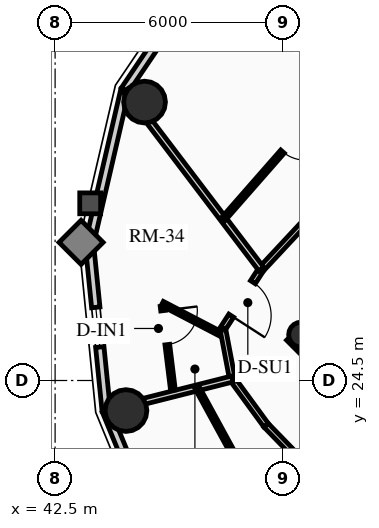
"""IFC4 building model, lengths in metres.
Left out: names, types, materials, properties, quantities, classifications, styles, units other than length and angle.
Written with IfcOpenShell. Run it as: python <this file> out.ifc"""

import sys

from ifc_helpers import new_model, si_unit, direction, frame, frame_2d, origin, origin_2d, place, context, subcontext, project, spatial, rectangle, circle, hollow_circle, extrude, source, transform, mapped, element, fill, save


model = new_model("IFC4")
c1 = context("Model", 3, precision=1e-05, world=origin(), true_north=direction((0.0, 1.0)))
c2 = subcontext(c1, "Body", "Model", "MODEL_VIEW")
j1 = project(units=[si_unit("LENGTHUNIT", "METRE"), si_unit("PLANEANGLEUNIT", "RADIAN")], contexts=[c1])
p1 = place(None, origin())
s1 = spatial("IfcSite", under=j1, at=p1, CompositionType="ELEMENT")
p2 = place(p1, origin())
s2 = spatial("IfcBuilding", under=s1, at=p2, CompositionType="ELEMENT")
p3 = place(p2, frame((0.0, 0.0, 219.94)))
s3 = spatial("IfcBuildingStorey", under=s2, at=p3, CompositionType="ELEMENT", Elevation=219.94)
p4 = place(p3, frame((58.702, 15.732, 0.0), z_axis=(0.0, 0.0, 1.0), x_axis=(-0.707106781187, 0.707106781187, 0.0)))
e1 = element("IfcWall", 1, at=p4, inside=s3, PredefinedType="SHEAR", context=c2, shape_type="SweptSolid", body=[
    extrude(rectangle(XDim=14.1, YDim=0.4, at=frame_2d((7.05, 0.0))), origin(), (0.0, 0.0, 1.0), 2.91),
])
p5 = place(p3, frame((48.873, 25.561, 0.0), z_axis=(0.0, 0.0, 1.0), x_axis=(0.707106781187, 0.707106781187, 0.0)))
e2 = element("IfcWall", 2, at=p5, inside=s3, PredefinedType="SHEAR", context=c2, shape_type="SweptSolid", body=[
    extrude(rectangle(XDim=10.7, YDim=0.4, at=frame_2d((5.35, 0.0))), origin(), (0.0, 0.0, 1.0), 2.91),
])
m1 = source(origin(), c2, "Body", "SweptSolid", [
    extrude(rectangle(XDim=1.5, YDim=2.02, at=frame_2d((0.75, 1.01))), frame((0.0, 0.21, 0.0), z_axis=(0.0, -1.0, 0.0), x_axis=(1.0, 0.0, 0.0)), (0.0, 0.0, 1.0), 0.42),
])
p6 = place(p5, frame((4.6, 0.0, 0.0)))
e3 = element("IfcOpeningElement", 3, at=p6, cuts=e2, PredefinedType="OPENING", context=c2, shape_type="MappedRepresentation", body=[
    mapped(m1, transform((0.0, 0.0, 0.0), x_axis=(1.0, 0.0, 0.0), y_axis=(0.0, 1.0, 0.0), z_axis=(0.0, 0.0, 1.0), scale=1.0)),
])
p7 = place(p3, frame((48.976, 25.706, 0.0), z_axis=(0.0, 0.0, 1.0), x_axis=(0.707106781187, 0.707106781187, 0.0)))
e4 = element("IfcColumn", 4, at=p7, inside=s3, PredefinedType="COLUMN", context=c2, shape_type="SweptSolid", body=[
    extrude(hollow_circle(Radius=0.33, WallThickness=0.025, at=origin_2d()), origin(), (0.0, 0.0, 1.0), 2.91),
])
for number, where, z_axis, x_axis in (
    (5, (44.854, 31.827, 0.0), (0.0, 0.0, 1.0), (1.0, 0.0, 0.0)),
    (6, (44.365, 23.709, 0.0), (0.0, 0.0, 1.0), (1.0, 0.0, 0.0)),
):
    element("IfcColumn", number, at=place(p3, frame(where, z_axis=z_axis, x_axis=x_axis)), inside=s3, PredefinedType="USERDEFINED", context=c2, shape_type="SweptSolid", body=[
        extrude(circle(Radius=0.55, at=origin_2d()), origin(), (0.0, 0.0, 1.0), 2.91),
    ])
p8 = place(p3, frame((44.337, 32.144, 0.0), z_axis=(0.0, 0.0, 1.0), x_axis=(0.559495003079, 0.828833723692, 0.0)))
e7 = element("IfcWall", 7, at=p8, inside=s3, PredefinedType="SOLIDWALL", context=c2, shape_type="SweptSolid", body=[
    extrude(rectangle(XDim=3.976, YDim=0.22, at=frame_2d((1.988, 0.0))), origin(), (0.0, 0.0, 1.0), 2.322),
])
m2 = source(origin(), c2, "Body", "SweptSolid", [
    extrude(rectangle(XDim=1.05, YDim=1.3, at=frame_2d((0.525, 0.65))), frame((0.0, 0.12, 0.0), z_axis=(0.0, -1.0, 0.0), x_axis=(1.0, 0.0, 0.0)), (0.0, 0.0, 1.0), 0.24),
])
p9 = place(p8, frame((1.463, 0.0, 0.65)))
e8 = element("IfcOpeningElement", 8, at=p9, cuts=e7, PredefinedType="OPENING", context=c2, shape_type="MappedRepresentation", body=[
    mapped(m2, transform((0.0, 0.0, 0.0), x_axis=(1.0, 0.0, 0.0), y_axis=(0.0, 1.0, 0.0), z_axis=(0.0, 0.0, 1.0), scale=1.0)),
])
p10 = place(p3, frame((43.401, 28.1, 0.0), z_axis=(0.0, 0.0, 1.0), x_axis=(0.225473813158, 0.974249228678, 0.0)))
e9 = element("IfcWall", 9, at=p10, inside=s3, PredefinedType="SOLIDWALL", context=c2, shape_type="SweptSolid", body=[
    extrude(rectangle(XDim=4.15, YDim=0.22, at=frame_2d((2.075, 0.0))), origin(), (0.0, 0.0, 1.0), 2.322),
])
p11 = place(p3, frame((43.845, 23.705, 0.0), z_axis=(0.0, 0.0, 1.0), x_axis=(-0.100570534541, 0.994929930991, 0.0)))
e10 = element("IfcWall", 10, at=p11, inside=s3, PredefinedType="SOLIDWALL", context=c2, shape_type="SweptSolid", body=[
    extrude(rectangle(XDim=4.418, YDim=0.22, at=frame_2d((2.209, 0.0))), origin(), (0.0, 0.0, 1.0), 2.322),
])
p12 = place(p11, frame((1.684, 0.0, 0.65)))
e11 = element("IfcOpeningElement", 11, at=p12, cuts=e10, PredefinedType="OPENING", context=c2, shape_type="MappedRepresentation", body=[
    mapped(m2, transform((0.0, 0.0, 0.0), x_axis=(1.0, 0.0, 0.0), y_axis=(0.0, 1.0, 0.0), z_axis=(0.0, 0.0, 1.0), scale=1.0)),
])
p13 = place(p3, frame((45.626, 19.387, 0.0), z_axis=(0.0, 0.0, 1.0), x_axis=(-0.381309704956, 0.924447353237, 0.0)))
e12 = element("IfcWall", 12, at=p13, inside=s3, PredefinedType="SOLIDWALL", context=c2, shape_type="SweptSolid", body=[
    extrude(rectangle(XDim=4.671, YDim=0.22, at=frame_2d((2.335, 0.0))), origin(), (0.0, 0.0, 1.0), 2.322),
])
p14 = place(p13, frame((1.81, 0.0, 0.65)))
e13 = element("IfcOpeningElement", 13, at=p14, cuts=e12, PredefinedType="OPENING", context=c2, shape_type="MappedRepresentation", body=[
    mapped(m2, transform((0.0, 0.0, 0.0), x_axis=(1.0, 0.0, 0.0), y_axis=(0.0, 1.0, 0.0), z_axis=(0.0, 0.0, 1.0), scale=1.0)),
])
p15 = place(p3, frame((52.212, 32.024, 0.0), z_axis=(0.0, 0.0, 1.0), x_axis=(-0.682158998173, -0.731203871169, 0.0)))
e14 = element("IfcWall", 14, at=p15, inside=s3, PredefinedType="PARTITIONING", context=c2, shape_type="SweptSolid", body=[
    extrude(rectangle(XDim=6.282, YDim=0.15, at=frame_2d((3.141, 0.0))), origin(), (0.0, 0.0, 1.0), 2.255),
])
p16 = place(p3, frame((47.927, 27.431, 0.0), z_axis=(0.0, 0.0, 1.0), x_axis=(-0.543126643356, -0.839650790077, 0.0)))
e15 = element("IfcWall", 15, at=p16, inside=s3, PredefinedType="PARTITIONING", context=c2, shape_type="SweptSolid", body=[
    extrude(rectangle(XDim=1.868, YDim=0.15, at=frame_2d((0.934, 0.0))), origin(), (0.0, 0.0, 1.0), 2.255),
])
m3 = source(origin(), c2, "Body", "SweptSolid", [
    extrude(rectangle(XDim=1.05, YDim=2.015, at=frame_2d((0.525, 1.007))), frame((0.0, 0.085, 0.0), z_axis=(0.0, -1.0, 0.0), x_axis=(1.0, 0.0, 0.0)), (0.0, 0.0, 1.0), 0.17),
])
p17 = place(p16, frame((0.409, 0.0, 0.0)))
e16 = element("IfcOpeningElement", 16, at=p17, cuts=e15, PredefinedType="OPENING", context=c2, shape_type="MappedRepresentation", body=[
    mapped(m3, transform((0.0, 0.0, 0.0), x_axis=(1.0, 0.0, 0.0), y_axis=(0.0, 1.0, 0.0), z_axis=(0.0, 0.0, 1.0), scale=1.0)),
])
p18 = place(p3, frame((46.912, 25.862, 0.0), z_axis=(0.0, 0.0, 1.0), x_axis=(0.186095172215, -0.98253172309, 0.0)))
e17 = element("IfcWall", 17, at=p18, inside=s3, PredefinedType="PARTITIONING", context=c2, shape_type="SweptSolid", body=[
    extrude(rectangle(XDim=1.346, YDim=0.15, at=frame_2d((0.673, 0.0))), origin(), (0.0, 0.0, 1.0), 2.322),
])
p19 = place(p3, frame((47.163, 24.54, 0.0), z_axis=(0.0, 0.0, 1.0), x_axis=(0.589711902124, -0.807613690135, 0.0)))
e18 = element("IfcWall", 18, at=p19, inside=s3, PredefinedType="PARTITIONING", context=c2, shape_type="SweptSolid", body=[
    extrude(rectangle(XDim=1.507, YDim=0.15, at=frame_2d((0.753, 0.0))), origin(), (0.0, 0.0, 1.0), 2.255),
])
p20 = place(p3, frame((48.052, 23.323, 0.0), z_axis=(0.0, 0.0, 1.0), x_axis=(0.696573981306, -0.717484974454, 0.0)))
e19 = element("IfcWall", 19, at=p20, inside=s3, PredefinedType="PARTITIONING", context=c2, shape_type="SweptSolid", body=[
    extrude(rectangle(XDim=5.849, YDim=0.15, at=frame_2d((2.925, 0.0))), origin(), (0.0, 0.0, 1.0), 2.685),
])
p21 = place(p3, frame((47.927, 27.431, 0.0), z_axis=(0.0, 0.0, 1.0), x_axis=(-0.604823333103, 0.796359677366, 0.0)))
e20 = element("IfcWall", 20, at=p21, inside=s3, PredefinedType="PARTITIONING", context=c2, shape_type="SweptSolid", body=[
    extrude(rectangle(XDim=5.907, YDim=0.16, at=frame_2d((2.953, 0.0))), origin(), (0.0, 0.0, 1.0), 2.322),
])
p22 = place(p3, frame((47.163, 24.54, 0.0), z_axis=(0.0, 0.0, 1.0), x_axis=(-0.9696166611, -0.244629373781, 0.0)))
e21 = element("IfcWall", 21, at=p22, inside=s3, PredefinedType="PARTITIONING", context=c2, shape_type="SweptSolid", body=[
    extrude(rectangle(XDim=3.401, YDim=0.16, at=frame_2d((1.701, 0.0))), origin(), (0.0, 0.0, 1.0), 2.322),
])
p23 = place(p3, frame((50.634, 32.977, 0.0), z_axis=(0.0, 0.0, 1.0), x_axis=(-0.659241945747, -0.751930885765, 0.0)))
e22 = element("IfcWall", 22, at=p23, inside=s3, PredefinedType="PARTITIONING", context=c2, shape_type="SweptSolid", body=[
    extrude(rectangle(XDim=5.624, YDim=0.125, at=frame_2d((2.812, 0.0))), origin(), (0.0, 0.0, 1.0), 2.255),
])
m4 = source(origin(), c2, "Body", "SweptSolid", [
    extrude(rectangle(XDim=0.9, YDim=2.005, at=frame_2d((0.45, 1.002))), frame((0.0, 0.073, 0.0), z_axis=(0.0, -1.0, 0.0), x_axis=(1.0, 0.0, 0.0)), (0.0, 0.0, 1.0), 0.145),
])
p24 = place(p23, frame((2.362, 0.0, 0.0)))
e23 = element("IfcOpeningElement", 23, at=p24, cuts=e22, PredefinedType="OPENING", context=c2, shape_type="MappedRepresentation", body=[
    mapped(m4, transform((0.0, 0.0, 0.0), x_axis=(1.0, 0.0, 0.0), y_axis=(0.0, 1.0, 0.0), z_axis=(0.0, 0.0, 1.0), scale=1.0)),
])
p25 = place(p3, frame((46.844, 25.731, 0.0), z_axis=(0.0, 0.0, 1.0), x_axis=(-0.886802533251, 0.462148533504, 0.0)))
e24 = element("IfcWall", 24, at=p25, inside=s3, PredefinedType="PARTITIONING", context=c2, shape_type="SweptSolid", body=[
    extrude(rectangle(XDim=1.719, YDim=0.125, at=frame_2d((0.859, 0.0))), origin(), (0.0, 0.0, 1.0), 2.685),
])
p26 = place(p3, frame((45.328, 26.457, 0.0), z_axis=(0.0, 0.0, 1.0), x_axis=(0.122605181354, -0.992455525203, 0.0)))
e25 = element("IfcWall", 25, at=p26, inside=s3, PredefinedType="PARTITIONING", context=c2, shape_type="SweptSolid", body=[
    extrude(rectangle(XDim=2.228, YDim=0.125, at=frame_2d((1.114, 0.0))), origin(), (0.0, 0.0, 1.0), 2.322),
])
p27 = place(p26, frame((0.12, 0.0, 0.0)))
e26 = element("IfcOpeningElement", 26, at=p27, cuts=e25, PredefinedType="OPENING", context=c2, shape_type="MappedRepresentation", body=[
    mapped(m4, transform((0.0, 0.0, 0.0), x_axis=(1.0, 0.0, 0.0), y_axis=(0.0, 1.0, 0.0), z_axis=(0.0, 0.0, 1.0), scale=1.0)),
])
p28 = place(p3, frame((46.24, 24.307, 0.0), z_axis=(0.0, 0.0, 1.0), x_axis=(0.479212341296, -0.87769899849, 0.0)))
e27 = element("IfcWall", 27, at=p28, inside=s3, PredefinedType="PARTITIONING", context=c2, shape_type="SweptSolid", body=[
    extrude(rectangle(XDim=2.374, YDim=0.125, at=frame_2d((1.187, 0.0))), origin(), (0.0, 0.0, 1.0), 2.255),
])
m5 = source(origin(), c2, "Body", "SweptSolid", [
    extrude(rectangle(XDim=1.05, YDim=1.3, at=frame_2d((0.525, 0.65))), frame((0.0, 0.03, 0.0), z_axis=(0.0, -1.0, 0.0), x_axis=(1.0, 0.0, 0.0)), (0.0, 0.0, 1.0), 0.06),
])
p29 = place(p12, origin())
e28 = element("IfcWindow", 28, at=p29, inside=s3, PartitioningType="SINGLE_PANEL", PredefinedType="WINDOW", context=c2, shape_type="MappedRepresentation", body=[
    mapped(m5, transform((0.0, 0.0, 0.0), x_axis=(1.0, 0.0, 0.0), y_axis=(0.0, 1.0, 0.0), z_axis=(0.0, 0.0, 1.0), scale=1.0)),
])
fill(e11, e28)
m6 = source(origin(), c2, "Body", "SweptSolid", [
    extrude(rectangle(XDim=0.9, YDim=2.005, at=frame_2d((0.45, 1.002))), frame((0.0, 0.025, 0.0), z_axis=(0.0, -1.0, 0.0), x_axis=(1.0, 0.0, 0.0)), (0.0, 0.0, 1.0), 0.05),
])
p30 = place(p24, origin())
e29 = element("IfcDoor", 29, at=p30, inside=s3, OperationType="SINGLE_SWING_LEFT", PredefinedType="DOOR", context=c2, shape_type="MappedRepresentation", body=[
    mapped(m6, transform((0.0, 0.0, 0.0), x_axis=(1.0, 0.0, 0.0), y_axis=(0.0, 1.0, 0.0), z_axis=(0.0, 0.0, 1.0), scale=1.0)),
])
fill(e23, e29)
m7 = source(origin(), c2, "Body", "SweptSolid", [
    extrude(rectangle(XDim=1.05, YDim=2.015, at=frame_2d((0.525, 1.007))), frame((0.0, 0.025, 0.0), z_axis=(0.0, -1.0, 0.0), x_axis=(1.0, 0.0, 0.0)), (0.0, 0.0, 1.0), 0.05),
])
p31 = place(p17, origin())
e30 = element("IfcDoor", 30, at=p31, inside=s3, OperationType="SINGLE_SWING_RIGHT", PredefinedType="DOOR", context=c2, shape_type="MappedRepresentation", body=[
    mapped(m7, transform((0.0, 0.0, 0.0), x_axis=(1.0, 0.0, 0.0), y_axis=(0.0, 1.0, 0.0), z_axis=(0.0, 0.0, 1.0), scale=1.0)),
])
fill(e16, e30)
p32 = place(p27, origin())
e31 = element("IfcDoor", 31, at=p32, inside=s3, OperationType="SINGLE_SWING_LEFT", PredefinedType="DOOR", context=c2, shape_type="MappedRepresentation", body=[
    mapped(m6, transform((0.0, 0.0, 0.0), x_axis=(1.0, 0.0, 0.0), y_axis=(0.0, 1.0, 0.0), z_axis=(0.0, 0.0, 1.0), scale=1.0)),
])
fill(e26, e31)
save(model, sys.argv[1])
